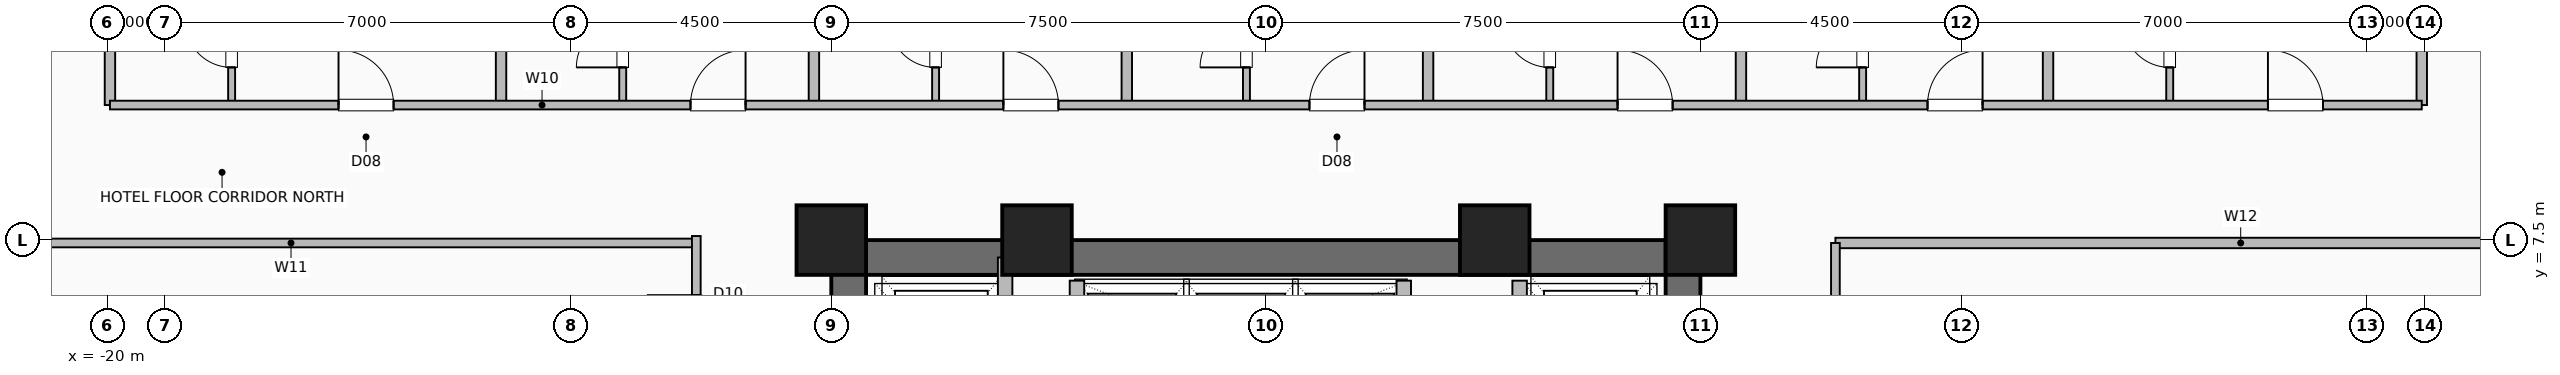
"""IFC4 building model, lengths in metres.
Left out: names, types, materials, properties, quantities, classifications, styles, units other than length and angle.
Written with IfcOpenShell. Run it as: python <this file> out.ifc"""

import sys

from ifc_helpers import new_model, si_unit, direction, frame, frame_2d, origin, origin_2d, place, context, subcontext, project, spatial, rectangle, hollow_rectangle, extrude, element, fill, save


model = new_model("IFC4")
c1 = context("Model", 3, precision=1e-05, world=origin(), true_north=direction((0.0, 1.0)))
c2 = subcontext(c1, "Body", "Model", "MODEL_VIEW")
j1 = project(units=[si_unit("LENGTHUNIT", "METRE"), si_unit("PLANEANGLEUNIT", "RADIAN")], contexts=[c1])
p1 = place(None, origin())
s1 = spatial("IfcSite", under=j1, at=p1, CompositionType="ELEMENT")
p2 = place(p1, origin())
s2 = spatial("IfcBuilding", under=s1, at=p2, CompositionType="ELEMENT")
p3 = place(p2, frame((0.0, 0.0, 69.0)))
s3 = spatial("IfcBuildingStorey", under=s2, at=p3, CompositionType="ELEMENT", Elevation=69.0)
for number, where, z_axis, x_axis in (
    (1, (7.5, 7.5, 0.0), (0.0, 0.0, 1.0), (1.0, 0.0, 0.0)),
    (2, (3.95, 7.5, 0.0), (0.0, 0.0, 1.0), (1.0, 0.0, 0.0)),
    (3, (-3.95, 7.5, 0.0), (0.0, 0.0, 1.0), (1.0, 0.0, 0.0)),
    (4, (-7.5, 7.5, 0.0), (0.0, 0.0, 1.0), (1.0, 0.0, 0.0)),
):
    element("IfcColumn", number, at=place(p3, frame(where, z_axis=z_axis, x_axis=x_axis)), inside=s3, PredefinedType="COLUMN", context=c2, shape_type="SweptSolid", body=[
        extrude(hollow_rectangle(XDim=1.2, YDim=1.2, WallThickness=0.055, at=origin_2d()), origin(), (0.0, 0.0, 1.0), 3.5),
    ])
p4 = place(p3, frame((-7.5, 7.2, 0.0), z_axis=(0.0, 0.0, 1.0), x_axis=(1.0, 0.0, 0.0)))
e5 = element("IfcWall", 5, at=p4, inside=s3, PredefinedType="SHEAR", context=c2, shape_type="SweptSolid", body=[
    extrude(rectangle(XDim=15.0, YDim=0.6, at=frame_2d((7.5, 0.0))), origin(), (0.0, 0.0, 1.0), 3.25),
])
p5 = place(p3, frame((-7.2, -7.5, 0.0), z_axis=(0.0, 0.0, 1.0), x_axis=(0.0, 1.0, 0.0)))
e6 = element("IfcWall", 6, at=p5, inside=s3, PredefinedType="SHEAR", context=c2, shape_type="SweptSolid", body=[
    extrude(rectangle(XDim=15.0, YDim=0.6, at=frame_2d((7.5, 0.0))), origin(), (0.0, 0.0, 1.0), 3.25),
])
p6 = place(p5, frame((9.5, 0.0, 0.0)))
e7 = element("IfcOpeningElement", 7, at=p6, cuts=e6, PredefinedType="OPENING", context=c2, shape_type="SweptSolid", body=[
    extrude(rectangle(XDim=1.0, YDim=2.08, at=frame_2d((0.5, 1.04))), frame((0.0, 0.31, 0.0), z_axis=(0.0, -1.0, 0.0), x_axis=(1.0, 0.0, 0.0)), (0.0, 0.0, 1.0), 0.62),
])
p7 = place(p3, frame((7.2, -7.5, 0.0), z_axis=(0.0, 0.0, 1.0), x_axis=(0.0, 1.0, 0.0)))
e8 = element("IfcWall", 8, at=p7, inside=s3, PredefinedType="SHEAR", context=c2, shape_type="SweptSolid", body=[
    extrude(rectangle(XDim=15.0, YDim=0.6, at=frame_2d((7.5, 0.0))), origin(), (0.0, 0.0, 1.0), 3.25),
])
for number, where, z_axis, x_axis in (
    (9, (-3.26, 4.58, 0.0), (0.0, 0.0, 1.0), (0.0, 1.0, 0.0)),
    (10, (2.38, 4.58, 0.0), (0.0, 0.0, 1.0), (0.0, 1.0, 0.0)),
):
    element("IfcWall", number, at=place(p3, frame(where, z_axis=z_axis, x_axis=x_axis)), inside=s3, PredefinedType="SHEAR", context=c2, shape_type="SweptSolid", body=[
        extrude(rectangle(XDim=2.22, YDim=0.25, at=frame_2d((1.11, 0.0))), origin(), (0.0, 0.0, 1.0), 3.25),
    ])
p8 = place(p3, frame((-4.5, 4.35, 0.0), z_axis=(0.0, 0.0, 1.0), x_axis=(0.0, 1.0, 0.0)))
e11 = element("IfcWall", 11, at=p8, inside=s3, PredefinedType="SHEAR", context=c2, shape_type="SweptSolid", body=[
    extrude(rectangle(XDim=2.85, YDim=0.25, at=frame_2d((1.425, 0.0))), origin(), (0.0, 0.0, 1.0), 3.25),
])
p9 = place(p3, frame((4.38, 4.3, 0.0), z_axis=(0.0, 0.0, 1.0), x_axis=(0.0, 1.0, 0.0)))
e12 = element("IfcWall", 12, at=p9, inside=s3, PredefinedType="SHEAR", context=c2, shape_type="SweptSolid", body=[
    extrude(rectangle(XDim=2.5, YDim=0.25, at=frame_2d((1.25, 0.0))), origin(), (0.0, 0.0, 1.0), 3.25),
])
p10 = place(p9, frame((0.8, 0.0, 0.0)))
e13 = element("IfcOpeningElement", 13, at=p10, cuts=e12, PredefinedType="OPENING", context=c2, shape_type="SweptSolid", body=[
    extrude(rectangle(XDim=1.2, YDim=2.2, at=frame_2d((0.6, 1.1))), frame((0.0, 0.135, 0.0), z_axis=(0.0, -1.0, 0.0), x_axis=(1.0, 0.0, 0.0)), (0.0, 0.0, 1.0), 0.27),
])
p11 = place(p3, frame((-17.85, 9.83, 0.0), z_axis=(0.0, 0.0, 1.0), x_axis=(0.0, 1.0, 0.0)))
e14 = element("IfcWall", 14, at=p11, inside=s3, PredefinedType="PLUMBINGWALL", context=c2, shape_type="SweptSolid", body=[
    extrude(rectangle(XDim=2.25, YDim=0.12, at=frame_2d((1.125, 0.0))), origin(), (0.0, 0.0, 1.0), 3.25),
])
p12 = place(p11, frame((0.65, 0.0, 0.0)))
e15 = element("IfcOpeningElement", 15, at=p12, cuts=e14, PredefinedType="OPENING", context=c2, shape_type="SweptSolid", body=[
    extrude(rectangle(XDim=0.8, YDim=2.05, at=frame_2d((0.4, 1.025))), frame((0.0, 0.07, 0.0), z_axis=(0.0, -1.0, 0.0), x_axis=(1.0, 0.0, 0.0)), (0.0, 0.0, 1.0), 0.14),
])
p13 = place(p3, frame((-11.1, 9.83, 0.0), z_axis=(0.0, 0.0, 1.0), x_axis=(0.0, 1.0, 0.0)))
e16 = element("IfcWall", 16, at=p13, inside=s3, PredefinedType="PLUMBINGWALL", context=c2, shape_type="SweptSolid", body=[
    extrude(rectangle(XDim=2.25, YDim=0.12, at=frame_2d((1.125, 0.0))), origin(), (0.0, 0.0, 1.0), 3.25),
])
p14 = place(p13, frame((0.65, 0.0, 0.0)))
e17 = element("IfcOpeningElement", 17, at=p14, cuts=e16, PredefinedType="OPENING", context=c2, shape_type="SweptSolid", body=[
    extrude(rectangle(XDim=0.8, YDim=2.05, at=frame_2d((0.4, 1.025))), frame((0.0, 0.07, 0.0), z_axis=(0.0, -1.0, 0.0), x_axis=(1.0, 0.0, 0.0)), (0.0, 0.0, 1.0), 0.14),
])
p15 = place(p3, frame((-5.7, 9.83, 0.0), z_axis=(0.0, 0.0, 1.0), x_axis=(0.0, 1.0, 0.0)))
e18 = element("IfcWall", 18, at=p15, inside=s3, PredefinedType="PLUMBINGWALL", context=c2, shape_type="SweptSolid", body=[
    extrude(rectangle(XDim=2.25, YDim=0.12, at=frame_2d((1.125, 0.0))), origin(), (0.0, 0.0, 1.0), 3.25),
])
p16 = place(p15, frame((0.65, 0.0, 0.0)))
e19 = element("IfcOpeningElement", 19, at=p16, cuts=e18, PredefinedType="OPENING", context=c2, shape_type="SweptSolid", body=[
    extrude(rectangle(XDim=0.8, YDim=2.05, at=frame_2d((0.4, 1.025))), frame((0.0, 0.07, 0.0), z_axis=(0.0, -1.0, 0.0), x_axis=(1.0, 0.0, 0.0)), (0.0, 0.0, 1.0), 0.14),
])
p17 = place(p3, frame((-0.335, 9.83, 0.0), z_axis=(0.0, 0.0, 1.0), x_axis=(0.0, 1.0, 0.0)))
e20 = element("IfcWall", 20, at=p17, inside=s3, PredefinedType="PLUMBINGWALL", context=c2, shape_type="SweptSolid", body=[
    extrude(rectangle(XDim=2.25, YDim=0.12, at=frame_2d((1.125, 0.0))), origin(), (0.0, 0.0, 1.0), 3.25),
])
p18 = place(p17, frame((0.65, 0.0, 0.0)))
e21 = element("IfcOpeningElement", 21, at=p18, cuts=e20, PredefinedType="OPENING", context=c2, shape_type="SweptSolid", body=[
    extrude(rectangle(XDim=0.8, YDim=2.05, at=frame_2d((0.4, 1.025))), frame((0.0, 0.07, 0.0), z_axis=(0.0, -1.0, 0.0), x_axis=(1.0, 0.0, 0.0)), (0.0, 0.0, 1.0), 0.14),
])
p19 = place(p3, frame((4.9, 9.83, 0.0), z_axis=(0.0, 0.0, 1.0), x_axis=(0.0, 1.0, 0.0)))
e22 = element("IfcWall", 22, at=p19, inside=s3, PredefinedType="PLUMBINGWALL", context=c2, shape_type="SweptSolid", body=[
    extrude(rectangle(XDim=2.25, YDim=0.12, at=frame_2d((1.125, 0.0))), origin(), (0.0, 0.0, 1.0), 2.818),
])
p20 = place(p19, frame((0.65, 0.0, 0.0)))
e23 = element("IfcOpeningElement", 23, at=p20, cuts=e22, PredefinedType="OPENING", context=c2, shape_type="SweptSolid", body=[
    extrude(rectangle(XDim=0.8, YDim=2.05, at=frame_2d((0.4, 1.025))), frame((0.0, 0.07, 0.0), z_axis=(0.0, -1.0, 0.0), x_axis=(1.0, 0.0, 0.0)), (0.0, 0.0, 1.0), 0.14),
])
p21 = place(p3, frame((10.3, 9.83, 0.0), z_axis=(0.0, 0.0, 1.0), x_axis=(0.0, 1.0, 0.0)))
e24 = element("IfcWall", 24, at=p21, inside=s3, PredefinedType="PLUMBINGWALL", context=c2, shape_type="SweptSolid", body=[
    extrude(rectangle(XDim=2.25, YDim=0.12, at=frame_2d((1.125, 0.0))), origin(), (0.0, 0.0, 1.0), 3.25),
])
p22 = place(p21, frame((0.65, 0.0, 0.0)))
e25 = element("IfcOpeningElement", 25, at=p22, cuts=e24, PredefinedType="OPENING", context=c2, shape_type="SweptSolid", body=[
    extrude(rectangle(XDim=0.8, YDim=2.05, at=frame_2d((0.4, 1.025))), frame((0.0, 0.07, 0.0), z_axis=(0.0, -1.0, 0.0), x_axis=(1.0, 0.0, 0.0)), (0.0, 0.0, 1.0), 0.14),
])
p23 = place(p3, frame((15.6, 9.83, 0.0), z_axis=(0.0, 0.0, 1.0), x_axis=(0.0, 1.0, 0.0)))
e26 = element("IfcWall", 26, at=p23, inside=s3, PredefinedType="PLUMBINGWALL", context=c2, shape_type="SweptSolid", body=[
    extrude(rectangle(XDim=2.25, YDim=0.12, at=frame_2d((1.125, 0.0))), origin(), (0.0, 0.0, 1.0), 3.25),
])
p24 = place(p23, frame((0.65, 0.0, 0.0)))
e27 = element("IfcOpeningElement", 27, at=p24, cuts=e26, PredefinedType="OPENING", context=c2, shape_type="SweptSolid", body=[
    extrude(rectangle(XDim=0.8, YDim=2.05, at=frame_2d((0.4, 1.025))), frame((0.0, 0.07, 0.0), z_axis=(0.0, -1.0, 0.0), x_axis=(1.0, 0.0, 0.0)), (0.0, 0.0, 1.0), 0.14),
])
for number, where, z_axis, x_axis in (
    (28, (-19.95, 9.83, 0.0), (0.0, 0.0, 1.0), (0.0, 1.0, 0.0)),
    (29, (-13.2, 9.83, 0.0), (0.0, 0.0, 1.0), (0.0, 1.0, 0.0)),
    (30, (-7.8, 9.83, 0.0), (0.0, 0.0, 1.0), (0.0, 1.0, 0.0)),
    (31, (-2.4, 9.83, 0.0), (0.0, 0.0, 1.0), (0.0, 1.0, 0.0)),
    (32, (2.8, 9.83, 0.0), (0.0, 0.0, 1.0), (0.0, 1.0, 0.0)),
    (33, (8.2, 9.83, 0.0), (0.0, 0.0, 1.0), (0.0, 1.0, 0.0)),
    (34, (13.5, 9.83, 0.0), (0.0, 0.0, 1.0), (0.0, 1.0, 0.0)),
    (35, (19.95, 9.83, 0.0), (0.0, 0.0, 1.0), (0.0, 1.0, 0.0)),
):
    element("IfcWall", number, at=place(p3, frame(where, z_axis=z_axis, x_axis=x_axis)), inside=s3, PredefinedType="PARTITIONING", context=c2, shape_type="SweptSolid", body=[
        extrude(rectangle(XDim=13.99, YDim=0.18, at=frame_2d((6.995, 0.0))), origin(), (0.0, 0.0, 1.0), 3.25),
    ])
p25 = place(p3, frame((-19.95, 9.83, 0.0), z_axis=(0.0, 0.0, 1.0), x_axis=(1.0, 0.0, 0.0)))
e36 = element("IfcWall", 36, at=p25, inside=s3, PredefinedType="PARTITIONING", context=c2, shape_type="SweptSolid", body=[
    extrude(rectangle(XDim=39.9, YDim=0.15, at=frame_2d((19.95, 0.0))), origin(), (0.0, 0.0, 1.0), 3.25),
])
p26 = place(p25, frame((3.945, 0.0, 0.0)))
e37 = element("IfcOpeningElement", 37, at=p26, cuts=e36, PredefinedType="OPENING", context=c2, shape_type="SweptSolid", body=[
    extrude(rectangle(XDim=0.95, YDim=2.08, at=frame_2d((0.475, 1.04))), frame((0.0, 0.085, 0.0), z_axis=(0.0, -1.0, 0.0), x_axis=(1.0, 0.0, 0.0)), (0.0, 0.0, 1.0), 0.17),
])
p27 = place(p25, frame((10.02, 0.0, 0.0)))
e38 = element("IfcOpeningElement", 38, at=p27, cuts=e36, PredefinedType="OPENING", context=c2, shape_type="SweptSolid", body=[
    extrude(rectangle(XDim=0.95, YDim=2.08, at=frame_2d((0.475, 1.04))), frame((0.0, 0.085, 0.0), z_axis=(0.0, -1.0, 0.0), x_axis=(1.0, 0.0, 0.0)), (0.0, 0.0, 1.0), 0.17),
])
p28 = place(p25, frame((15.42, 0.0, 0.0)))
e39 = element("IfcOpeningElement", 39, at=p28, cuts=e36, PredefinedType="OPENING", context=c2, shape_type="SweptSolid", body=[
    extrude(rectangle(XDim=0.95, YDim=2.08, at=frame_2d((0.475, 1.04))), frame((0.0, 0.085, 0.0), z_axis=(0.0, -1.0, 0.0), x_axis=(1.0, 0.0, 0.0)), (0.0, 0.0, 1.0), 0.17),
])
p29 = place(p25, frame((20.702, 0.0, 0.0)))
e40 = element("IfcOpeningElement", 40, at=p29, cuts=e36, PredefinedType="OPENING", context=c2, shape_type="SweptSolid", body=[
    extrude(rectangle(XDim=0.95, YDim=2.08, at=frame_2d((0.475, 1.04))), frame((0.0, 0.085, 0.0), z_axis=(0.0, -1.0, 0.0), x_axis=(1.0, 0.0, 0.0)), (0.0, 0.0, 1.0), 0.17),
])
p30 = place(p25, frame((26.02, 0.0, 0.0)))
e41 = element("IfcOpeningElement", 41, at=p30, cuts=e36, PredefinedType="OPENING", context=c2, shape_type="SweptSolid", body=[
    extrude(rectangle(XDim=0.95, YDim=2.08, at=frame_2d((0.475, 1.04))), frame((0.0, 0.085, 0.0), z_axis=(0.0, -1.0, 0.0), x_axis=(1.0, 0.0, 0.0)), (0.0, 0.0, 1.0), 0.17),
])
p31 = place(p25, frame((31.37, 0.0, 0.0)))
e42 = element("IfcOpeningElement", 42, at=p31, cuts=e36, PredefinedType="OPENING", context=c2, shape_type="SweptSolid", body=[
    extrude(rectangle(XDim=0.95, YDim=2.08, at=frame_2d((0.475, 1.04))), frame((0.0, 0.085, 0.0), z_axis=(0.0, -1.0, 0.0), x_axis=(1.0, 0.0, 0.0)), (0.0, 0.0, 1.0), 0.17),
])
p32 = place(p25, frame((37.245, 0.0, 0.0)))
e43 = element("IfcOpeningElement", 43, at=p32, cuts=e36, PredefinedType="OPENING", context=c2, shape_type="SweptSolid", body=[
    extrude(rectangle(XDim=0.95, YDim=2.08, at=frame_2d((0.475, 1.04))), frame((0.0, 0.085, 0.0), z_axis=(0.0, -1.0, 0.0), x_axis=(1.0, 0.0, 0.0)), (0.0, 0.0, 1.0), 0.17),
])
p33 = place(p3, frame((-23.82, 7.45, 0.0), z_axis=(0.0, 0.0, 1.0), x_axis=(1.0, 0.0, 0.0)))
e44 = element("IfcWall", 44, at=p33, inside=s3, PredefinedType="PARTITIONING", context=c2, shape_type="SweptSolid", body=[
    extrude(rectangle(XDim=13.99, YDim=0.15, at=frame_2d((6.995, 0.0))), origin(), (0.0, 0.0, 1.0), 3.25),
])
p34 = place(p3, frame((-9.83, -7.57, 0.0), z_axis=(0.0, 0.0, 1.0), x_axis=(0.0, 1.0, 0.0)))
e45 = element("IfcWall", 45, at=p34, inside=s3, PredefinedType="PARTITIONING", context=c2, shape_type="SweptSolid", body=[
    extrude(rectangle(XDim=15.14, YDim=0.15, at=frame_2d((7.57, 0.0))), origin(), (0.0, 0.0, 1.0), 3.25),
])
p35 = place(p34, frame((2.47, 0.0, 0.0)))
e46 = element("IfcOpeningElement", 46, at=p35, cuts=e45, PredefinedType="OPENING", context=c2, shape_type="SweptSolid", body=[
    extrude(rectangle(XDim=0.95, YDim=2.06, at=frame_2d((0.475, 1.03))), frame((0.0, 0.085, 0.0), z_axis=(0.0, -1.0, 0.0), x_axis=(1.0, 0.0, 0.0)), (0.0, 0.0, 1.0), 0.17),
])
p36 = place(p34, frame((8.595, 0.0, 0.0)))
e47 = element("IfcOpeningElement", 47, at=p36, cuts=e45, PredefinedType="OPENING", context=c2, shape_type="SweptSolid", body=[
    extrude(rectangle(XDim=0.95, YDim=2.06, at=frame_2d((0.475, 1.03))), frame((0.0, 0.085, 0.0), z_axis=(0.0, -1.0, 0.0), x_axis=(1.0, 0.0, 0.0)), (0.0, 0.0, 1.0), 0.17),
])
p37 = place(p34, frame((13.27, 0.0, 0.0)))
e48 = element("IfcOpeningElement", 48, at=p37, cuts=e45, PredefinedType="OPENING", context=c2, shape_type="SweptSolid", body=[
    extrude(rectangle(XDim=0.85, YDim=2.05, at=frame_2d((0.425, 1.025))), frame((0.0, 0.085, 0.0), z_axis=(0.0, -1.0, 0.0), x_axis=(1.0, 0.0, 0.0)), (0.0, 0.0, 1.0), 0.17),
])
p38 = place(p3, frame((9.83, 7.45, 0.0), z_axis=(0.0, 0.0, 1.0), x_axis=(1.0, 0.0, 0.0)))
e49 = element("IfcWall", 49, at=p38, inside=s3, PredefinedType="PARTITIONING", context=c2, shape_type="SweptSolid", body=[
    extrude(rectangle(XDim=13.99, YDim=0.18, at=frame_2d((6.995, 0.0))), origin(), (0.0, 0.0, 1.0), 3.25),
])
p39 = place(p3, frame((9.83, -7.45, 0.0), z_axis=(0.0, 0.0, 1.0), x_axis=(0.0, 1.0, 0.0)))
e50 = element("IfcWall", 50, at=p39, inside=s3, PredefinedType="PARTITIONING", context=c2, shape_type="SweptSolid", body=[
    extrude(rectangle(XDim=14.9, YDim=0.15, at=frame_2d((7.45, 0.0))), origin(), (0.0, 0.0, 1.0), 3.25),
])
p40 = place(p39, frame((3.049, 0.0, 0.0)))
e51 = element("IfcOpeningElement", 51, at=p40, cuts=e50, PredefinedType="OPENING", context=c2, shape_type="SweptSolid", body=[
    extrude(rectangle(XDim=0.95, YDim=2.08, at=frame_2d((0.475, 1.04))), frame((0.0, 0.085, 0.0), z_axis=(0.0, -1.0, 0.0), x_axis=(1.0, 0.0, 0.0)), (0.0, 0.0, 1.0), 0.17),
])
p41 = place(p39, frame((7.927, 0.0, 0.0)))
e52 = element("IfcOpeningElement", 52, at=p41, cuts=e50, PredefinedType="OPENING", context=c2, shape_type="SweptSolid", body=[
    extrude(rectangle(XDim=0.95, YDim=2.08, at=frame_2d((0.475, 1.04))), frame((0.0, 0.085, 0.0), z_axis=(0.0, -1.0, 0.0), x_axis=(1.0, 0.0, 0.0)), (0.0, 0.0, 1.0), 0.17),
])
p42 = place(p39, frame((12.899, 0.0, 0.0)))
e53 = element("IfcOpeningElement", 53, at=p42, cuts=e50, PredefinedType="OPENING", context=c2, shape_type="SweptSolid", body=[
    extrude(rectangle(XDim=0.95, YDim=2.08, at=frame_2d((0.475, 1.04))), frame((0.0, 0.085, 0.0), z_axis=(0.0, -1.0, 0.0), x_axis=(1.0, 0.0, 0.0)), (0.0, 0.0, 1.0), 0.17),
])
p43 = place(p12, origin())
e54 = element("IfcDoor", 54, at=p43, inside=s3, OperationType="SINGLE_SWING_RIGHT", PredefinedType="DOOR", context=c2, shape_type="SweptSolid", body=[
    extrude(rectangle(XDim=0.8, YDim=2.05, at=frame_2d((0.4, 1.025))), frame((0.0, 0.025, 0.0), z_axis=(0.0, -1.0, 0.0), x_axis=(1.0, 0.0, 0.0)), (0.0, 0.0, 1.0), 0.05),
])
fill(e15, e54)
p44 = place(p14, origin())
e55 = element("IfcDoor", 55, at=p44, inside=s3, OperationType="SINGLE_SWING_LEFT", PredefinedType="DOOR", context=c2, shape_type="SweptSolid", body=[
    extrude(rectangle(XDim=0.8, YDim=2.05, at=frame_2d((0.4, 1.025))), frame((0.0, 0.025, 0.0), z_axis=(0.0, -1.0, 0.0), x_axis=(1.0, 0.0, 0.0)), (0.0, 0.0, 1.0), 0.05),
])
fill(e17, e55)
p45 = place(p16, origin())
e56 = element("IfcDoor", 56, at=p45, inside=s3, OperationType="SINGLE_SWING_RIGHT", PredefinedType="DOOR", context=c2, shape_type="SweptSolid", body=[
    extrude(rectangle(XDim=0.8, YDim=2.05, at=frame_2d((0.4, 1.025))), frame((0.0, 0.025, 0.0), z_axis=(0.0, -1.0, 0.0), x_axis=(1.0, 0.0, 0.0)), (0.0, 0.0, 1.0), 0.05),
])
fill(e19, e56)
p46 = place(p18, origin())
e57 = element("IfcDoor", 57, at=p46, inside=s3, OperationType="SINGLE_SWING_LEFT", PredefinedType="DOOR", context=c2, shape_type="SweptSolid", body=[
    extrude(rectangle(XDim=0.8, YDim=2.05, at=frame_2d((0.4, 1.025))), frame((0.0, 0.025, 0.0), z_axis=(0.0, -1.0, 0.0), x_axis=(1.0, 0.0, 0.0)), (0.0, 0.0, 1.0), 0.05),
])
fill(e21, e57)
p47 = place(p20, origin())
e58 = element("IfcDoor", 58, at=p47, inside=s3, OperationType="SINGLE_SWING_RIGHT", PredefinedType="DOOR", context=c2, shape_type="SweptSolid", body=[
    extrude(rectangle(XDim=0.8, YDim=2.05, at=frame_2d((0.4, 1.025))), frame((0.0, 0.025, 0.0), z_axis=(0.0, -1.0, 0.0), x_axis=(1.0, 0.0, 0.0)), (0.0, 0.0, 1.0), 0.05),
])
fill(e23, e58)
p48 = place(p22, origin())
e59 = element("IfcDoor", 59, at=p48, inside=s3, OperationType="SINGLE_SWING_LEFT", PredefinedType="DOOR", context=c2, shape_type="SweptSolid", body=[
    extrude(rectangle(XDim=0.8, YDim=2.05, at=frame_2d((0.4, 1.025))), frame((0.0, 0.025, 0.0), z_axis=(0.0, -1.0, 0.0), x_axis=(1.0, 0.0, 0.0)), (0.0, 0.0, 1.0), 0.05),
])
fill(e25, e59)
p49 = place(p24, origin())
e60 = element("IfcDoor", 60, at=p49, inside=s3, OperationType="SINGLE_SWING_RIGHT", PredefinedType="DOOR", context=c2, shape_type="SweptSolid", body=[
    extrude(rectangle(XDim=0.8, YDim=2.05, at=frame_2d((0.4, 1.025))), frame((0.0, 0.025, 0.0), z_axis=(0.0, -1.0, 0.0), x_axis=(1.0, 0.0, 0.0)), (0.0, 0.0, 1.0), 0.05),
])
fill(e27, e60)
p50 = place(p26, origin())
e61 = element("IfcDoor", 61, at=p50, inside=s3, OperationType="SINGLE_SWING_LEFT", PredefinedType="DOOR", context=c2, shape_type="SweptSolid", body=[
    extrude(rectangle(XDim=0.95, YDim=2.08, at=frame_2d((0.475, 1.04))), frame((0.0, 0.025, 0.0), z_axis=(0.0, -1.0, 0.0), x_axis=(1.0, 0.0, 0.0)), (0.0, 0.0, 1.0), 0.05),
])
fill(e37, e61)
p51 = place(p27, origin())
e62 = element("IfcDoor", 62, at=p51, inside=s3, OperationType="SINGLE_SWING_RIGHT", PredefinedType="DOOR", context=c2, shape_type="SweptSolid", body=[
    extrude(rectangle(XDim=0.95, YDim=2.08, at=frame_2d((0.475, 1.04))), frame((0.0, 0.025, 0.0), z_axis=(0.0, -1.0, 0.0), x_axis=(1.0, 0.0, 0.0)), (0.0, 0.0, 1.0), 0.05),
])
fill(e38, e62)
p52 = place(p28, origin())
e63 = element("IfcDoor", 63, at=p52, inside=s3, OperationType="SINGLE_SWING_LEFT", PredefinedType="DOOR", context=c2, shape_type="SweptSolid", body=[
    extrude(rectangle(XDim=0.95, YDim=2.08, at=frame_2d((0.475, 1.04))), frame((0.0, 0.025, 0.0), z_axis=(0.0, -1.0, 0.0), x_axis=(1.0, 0.0, 0.0)), (0.0, 0.0, 1.0), 0.05),
])
fill(e39, e63)
p53 = place(p29, origin())
e64 = element("IfcDoor", 64, at=p53, inside=s3, OperationType="SINGLE_SWING_RIGHT", PredefinedType="DOOR", context=c2, shape_type="SweptSolid", body=[
    extrude(rectangle(XDim=0.95, YDim=2.08, at=frame_2d((0.475, 1.04))), frame((0.0, 0.025, 0.0), z_axis=(0.0, -1.0, 0.0), x_axis=(1.0, 0.0, 0.0)), (0.0, 0.0, 1.0), 0.05),
])
fill(e40, e64)
p54 = place(p30, origin())
e65 = element("IfcDoor", 65, at=p54, inside=s3, OperationType="SINGLE_SWING_LEFT", PredefinedType="DOOR", context=c2, shape_type="SweptSolid", body=[
    extrude(rectangle(XDim=0.95, YDim=2.08, at=frame_2d((0.475, 1.04))), frame((0.0, 0.025, 0.0), z_axis=(0.0, -1.0, 0.0), x_axis=(1.0, 0.0, 0.0)), (0.0, 0.0, 1.0), 0.05),
])
fill(e41, e65)
p55 = place(p31, origin())
e66 = element("IfcDoor", 66, at=p55, inside=s3, OperationType="SINGLE_SWING_RIGHT", PredefinedType="DOOR", context=c2, shape_type="SweptSolid", body=[
    extrude(rectangle(XDim=0.95, YDim=2.08, at=frame_2d((0.475, 1.04))), frame((0.0, 0.025, 0.0), z_axis=(0.0, -1.0, 0.0), x_axis=(1.0, 0.0, 0.0)), (0.0, 0.0, 1.0), 0.05),
])
fill(e42, e66)
p56 = place(p32, origin())
e67 = element("IfcDoor", 67, at=p56, inside=s3, OperationType="SINGLE_SWING_LEFT", PredefinedType="DOOR", context=c2, shape_type="SweptSolid", body=[
    extrude(rectangle(XDim=0.95, YDim=2.08, at=frame_2d((0.475, 1.04))), frame((0.0, 0.025, 0.0), z_axis=(0.0, -1.0, 0.0), x_axis=(1.0, 0.0, 0.0)), (0.0, 0.0, 1.0), 0.05),
])
fill(e43, e67)
save(model, sys.argv[1])
